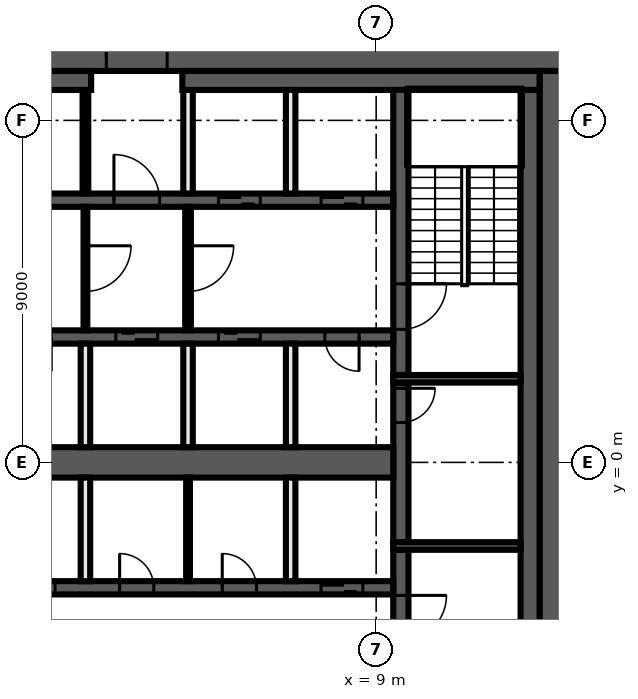
"""IFC4 building model, lengths in metres.
Left out: names, types, materials, properties, quantities, classifications, styles, units other than length and angle.
Written with IfcOpenShell. Run it as: python <this file> out.ifc"""

import sys

from ifc_helpers import new_model, si_unit, direction, frame, frame_2d, origin, place, context, subcontext, project, spatial, rectangle, extrude, element, fill, save


model = new_model("IFC4")
c1 = context("Model", 3, precision=1e-05, world=origin(), true_north=direction((0.0, 1.0)))
c2 = subcontext(c1, "Body", "Model", "MODEL_VIEW")
j1 = project(units=[si_unit("LENGTHUNIT", "METRE"), si_unit("PLANEANGLEUNIT", "RADIAN")], contexts=[c1])
p1 = place(None, origin())
s1 = spatial("IfcSite", under=j1, at=p1, CompositionType="ELEMENT")
p2 = place(p1, origin())
s2 = spatial("IfcBuilding", under=s1, at=p2, CompositionType="ELEMENT")
p3 = place(p2, frame((0.0, 0.0, 232.8)))
s3 = spatial("IfcBuildingStorey", under=s2, at=p3, CompositionType="ELEMENT", Elevation=232.8)
p4 = place(p3, frame((-14.0, 10.65, 0.0), z_axis=(0.0, 0.0, 1.0), x_axis=(1.0, 0.0, 0.0)))
e1 = element("IfcWall", 1, at=p4, inside=s3, PredefinedType="SHEAR", context=c2, shape_type="SweptSolid", body=[
    extrude(rectangle(XDim=28.0, YDim=0.7, at=frame_2d((14.0, 0.0))), origin(), (0.0, 0.0, 1.0), 3.75),
])
p5 = place(p4, frame((15.9, 0.0, 0.0)))
e2 = element("IfcOpeningElement", 2, at=p5, cuts=e1, PredefinedType="OPENING", context=c2, shape_type="SweptSolid", body=[
    extrude(rectangle(XDim=1.6, YDim=2.1, at=frame_2d((0.8, 1.05))), frame((0.0, 0.36, 0.0), z_axis=(0.0, -1.0, 0.0), x_axis=(1.0, 0.0, 0.0)), (0.0, 0.0, 1.0), 0.72),
])
p6 = place(p3, frame((13.65, 10.3, 0.0), z_axis=(0.0, 0.0, 1.0), x_axis=(0.0, -1.0, 0.0)))
e3 = element("IfcWall", 3, at=p6, inside=s3, PredefinedType="SHEAR", context=c2, shape_type="SweptSolid", body=[
    extrude(rectangle(XDim=20.6, YDim=0.7, at=frame_2d((10.3, 0.0))), origin(), (0.0, 0.0, 1.0), 3.75),
])
p7 = place(p3, frame((-13.3, 10.05, 0.0), z_axis=(0.0, 0.0, 1.0), x_axis=(1.0, 0.0, 0.0)))
e4 = element("IfcWall", 4, at=p7, inside=s3, PredefinedType="SHEAR", context=c2, shape_type="SweptSolid", body=[
    extrude(rectangle(XDim=14.8, YDim=0.5, at=frame_2d((7.4, 0.0))), origin(), (0.0, 0.0, 1.0), 3.75),
])
p8 = place(p3, frame((3.9, 10.05, 0.0), z_axis=(0.0, 0.0, 1.0), x_axis=(1.0, 0.0, 0.0)))
e5 = element("IfcWall", 5, at=p8, inside=s3, PredefinedType="SHEAR", context=c2, shape_type="SweptSolid", body=[
    extrude(rectangle(XDim=9.4, YDim=0.5, at=frame_2d((4.7, 0.0))), origin(), (0.0, 0.0, 1.0), 3.75),
])
p9 = place(p3, frame((13.05, 9.8, 0.0), z_axis=(0.0, 0.0, 1.0), x_axis=(0.0, -1.0, 0.0)))
e6 = element("IfcWall", 6, at=p9, inside=s3, PredefinedType="SHEAR", context=c2, shape_type="SweptSolid", body=[
    extrude(rectangle(XDim=19.6, YDim=0.5, at=frame_2d((9.8, 0.0))), origin(), (0.0, 0.0, 1.0), 3.75),
])
p10 = place(p3, frame((9.65, -2.3, 0.0), z_axis=(0.0, 0.0, 1.0), x_axis=(0.0, -1.0, 0.0)))
e7 = element("IfcWall", 7, at=p10, inside=s3, PredefinedType="SHEAR", context=c2, shape_type="SweptSolid", body=[
    extrude(rectangle(XDim=7.5, YDim=0.4, at=frame_2d((3.75, 0.0))), origin(), (0.0, 0.0, 1.0), 3.75),
])
p11 = place(p10, frame((1.2, 0.0, 0.0)))
e8 = element("IfcOpeningElement", 8, at=p11, cuts=e7, PredefinedType="OPENING", context=c2, shape_type="SweptSolid", body=[
    extrude(rectangle(XDim=1.2, YDim=2.1, at=frame_2d((0.6, 1.05))), frame((0.0, 0.21, 0.0), z_axis=(0.0, -1.0, 0.0), x_axis=(1.0, 0.0, 0.0)), (0.0, 0.0, 1.0), 0.42),
])
p12 = place(p3, frame((9.65, 2.1, 0.0), z_axis=(0.0, 0.0, 1.0), x_axis=(0.0, -1.0, 0.0)))
e9 = element("IfcWall", 9, at=p12, inside=s3, PredefinedType="SHEAR", context=c2, shape_type="SweptSolid", body=[
    extrude(rectangle(XDim=4.2, YDim=0.4, at=frame_2d((2.1, 0.0))), origin(), (0.0, 0.0, 1.0), 3.75),
])
p13 = place(p12, frame((0.15, 0.0, 0.0)))
e10 = element("IfcOpeningElement", 10, at=p13, cuts=e9, PredefinedType="OPENING", context=c2, shape_type="SweptSolid", body=[
    extrude(rectangle(XDim=0.9, YDim=2.1, at=frame_2d((0.45, 1.05))), frame((0.0, 0.21, 0.0), z_axis=(0.0, -1.0, 0.0), x_axis=(1.0, 0.0, 0.0)), (0.0, 0.0, 1.0), 0.42),
])
p14 = place(p3, frame((9.65, 9.8, 0.0), z_axis=(0.0, 0.0, 1.0), x_axis=(0.0, -1.0, 0.0)))
e11 = element("IfcWall", 11, at=p14, inside=s3, PredefinedType="SHEAR", context=c2, shape_type="SweptSolid", body=[
    extrude(rectangle(XDim=7.5, YDim=0.4, at=frame_2d((3.75, 0.0))), origin(), (0.0, 0.0, 1.0), 3.75),
])
p15 = place(p14, frame((5.1, 0.0, 0.0)))
e12 = element("IfcOpeningElement", 12, at=p15, cuts=e11, PredefinedType="OPENING", context=c2, shape_type="SweptSolid", body=[
    extrude(rectangle(XDim=1.2, YDim=2.1, at=frame_2d((0.6, 1.05))), frame((0.0, 0.21, 0.0), z_axis=(0.0, -1.0, 0.0), x_axis=(1.0, 0.0, 0.0)), (0.0, 0.0, 1.0), 0.42),
])
for number, where, z_axis, x_axis in (
    (13, (9.45, 2.2, 0.0), (0.0, 0.0, 1.0), (1.0, 0.0, 0.0)),
    (14, (9.45, -2.2, 0.0), (0.0, 0.0, 1.0), (1.0, 0.0, 0.0)),
):
    element("IfcWall", number, at=place(p3, frame(where, z_axis=z_axis, x_axis=x_axis)), inside=s3, PredefinedType="SHEAR", context=c2, shape_type="SweptSolid", body=[
        extrude(rectangle(XDim=3.35, YDim=0.2, at=frame_2d((1.675, 0.0))), origin(), (0.0, 0.0, 1.0), 3.75),
    ])
p16 = place(p3, frame((-9.45, 6.9, 0.0), z_axis=(0.0, 0.0, 1.0), x_axis=(1.0, 0.0, 0.0)))
e15 = element("IfcWall", 15, at=p16, inside=s3, PredefinedType="SHEAR", context=c2, shape_type="SweptSolid", body=[
    extrude(rectangle(XDim=18.9, YDim=0.35, at=frame_2d((9.45, 0.0))), origin(), (0.0, 0.0, 1.0), 3.75),
])
p17 = place(p16, frame((11.55, 0.0, 0.0)))
e16 = element("IfcOpeningElement", 16, at=p17, cuts=e15, PredefinedType="OPENING", context=c2, shape_type="SweptSolid", body=[
    extrude(rectangle(XDim=1.2, YDim=2.1, at=frame_2d((0.6, 1.05))), frame((0.0, 0.185, 0.0), z_axis=(0.0, -1.0, 0.0), x_axis=(1.0, 0.0, 0.0)), (0.0, 0.0, 1.0), 0.37),
])
p18 = place(p16, frame((14.3, 0.0, 0.0)))
e17 = element("IfcOpeningElement", 17, at=p18, cuts=e15, PredefinedType="OPENING", context=c2, shape_type="SweptSolid", body=[
    extrude(rectangle(XDim=1.1, YDim=2.1, at=frame_2d((0.55, 1.05))), frame((0.0, 0.185, 0.0), z_axis=(0.0, -1.0, 0.0), x_axis=(1.0, 0.0, 0.0)), (0.0, 0.0, 1.0), 0.37),
])
p19 = place(p16, frame((17.0, 0.0, 0.0)))
e18 = element("IfcOpeningElement", 18, at=p19, cuts=e15, PredefinedType="OPENING", context=c2, shape_type="SweptSolid", body=[
    extrude(rectangle(XDim=1.1, YDim=2.1, at=frame_2d((0.55, 1.05))), frame((0.0, 0.185, 0.0), z_axis=(0.0, -1.0, 0.0), x_axis=(1.0, 0.0, 0.0)), (0.0, 0.0, 1.0), 0.37),
])
p20 = place(p16, frame((2.25, 0.0, 0.0)))
e19 = element("IfcOpeningElement", 19, at=p20, cuts=e15, PredefinedType="OPENING", context=c2, shape_type="SweptSolid", body=[
    extrude(rectangle(XDim=0.9, YDim=2.1, at=frame_2d((0.45, 1.05))), frame((0.0, 0.185, 0.0), z_axis=(0.0, -1.0, 0.0), x_axis=(1.0, 0.0, 0.0)), (0.0, 0.0, 1.0), 0.37),
])
p21 = place(p16, frame((7.65, 0.0, 0.0)))
e20 = element("IfcOpeningElement", 20, at=p21, cuts=e15, PredefinedType="OPENING", context=c2, shape_type="SweptSolid", body=[
    extrude(rectangle(XDim=0.9, YDim=2.1, at=frame_2d((0.45, 1.05))), frame((0.0, 0.185, 0.0), z_axis=(0.0, -1.0, 0.0), x_axis=(1.0, 0.0, 0.0)), (0.0, 0.0, 1.0), 0.37),
])
p22 = place(p3, frame((9.45, 3.3, 0.0), z_axis=(0.0, 0.0, 1.0), x_axis=(-1.0, 0.0, 0.0)))
e21 = element("IfcWall", 21, at=p22, inside=s3, PredefinedType="SHEAR", context=c2, shape_type="SweptSolid", body=[
    extrude(rectangle(XDim=18.9, YDim=0.35, at=frame_2d((9.45, 0.0))), origin(), (0.0, 0.0, 1.0), 3.75),
])
p23 = place(p22, frame((6.2, 0.0, 0.0)))
e22 = element("IfcOpeningElement", 22, at=p23, cuts=e21, PredefinedType="OPENING", context=c2, shape_type="SweptSolid", body=[
    extrude(rectangle(XDim=1.1, YDim=2.1, at=frame_2d((0.55, 1.05))), frame((0.0, 0.185, 0.0), z_axis=(0.0, -1.0, 0.0), x_axis=(1.0, 0.0, 0.0)), (0.0, 0.0, 1.0), 0.37),
])
p24 = place(p22, frame((3.5, 0.0, 0.0)))
e23 = element("IfcOpeningElement", 23, at=p24, cuts=e21, PredefinedType="OPENING", context=c2, shape_type="SweptSolid", body=[
    extrude(rectangle(XDim=1.1, YDim=2.1, at=frame_2d((0.55, 1.05))), frame((0.0, 0.185, 0.0), z_axis=(0.0, -1.0, 0.0), x_axis=(1.0, 0.0, 0.0)), (0.0, 0.0, 1.0), 0.37),
])
p25 = place(p22, frame((0.9, 0.0, 0.0)))
e24 = element("IfcOpeningElement", 24, at=p25, cuts=e21, PredefinedType="OPENING", context=c2, shape_type="SweptSolid", body=[
    extrude(rectangle(XDim=0.9, YDim=2.1, at=frame_2d((0.45, 1.05))), frame((0.0, 0.185, 0.0), z_axis=(0.0, -1.0, 0.0), x_axis=(1.0, 0.0, 0.0)), (0.0, 0.0, 1.0), 0.37),
])
p26 = place(p22, frame((17.1, 0.0, 0.0)))
e25 = element("IfcOpeningElement", 25, at=p26, cuts=e21, PredefinedType="OPENING", context=c2, shape_type="SweptSolid", body=[
    extrude(rectangle(XDim=0.9, YDim=2.1, at=frame_2d((0.45, 1.05))), frame((0.0, 0.185, 0.0), z_axis=(0.0, -1.0, 0.0), x_axis=(1.0, 0.0, 0.0)), (0.0, 0.0, 1.0), 0.37),
])
p27 = place(p22, frame((14.4, 0.0, 0.0)))
e26 = element("IfcOpeningElement", 26, at=p27, cuts=e21, PredefinedType="OPENING", context=c2, shape_type="SweptSolid", body=[
    extrude(rectangle(XDim=0.9, YDim=2.1, at=frame_2d((0.45, 1.05))), frame((0.0, 0.185, 0.0), z_axis=(0.0, -1.0, 0.0), x_axis=(1.0, 0.0, 0.0)), (0.0, 0.0, 1.0), 0.37),
])
p28 = place(p22, frame((11.7, 0.0, 0.0)))
e27 = element("IfcOpeningElement", 27, at=p28, cuts=e21, PredefinedType="OPENING", context=c2, shape_type="SweptSolid", body=[
    extrude(rectangle(XDim=0.9, YDim=2.1, at=frame_2d((0.45, 1.05))), frame((0.0, 0.185, 0.0), z_axis=(0.0, -1.0, 0.0), x_axis=(1.0, 0.0, 0.0)), (0.0, 0.0, 1.0), 0.37),
])
p29 = place(p22, frame((9.0, 0.0, 0.0)))
e28 = element("IfcOpeningElement", 28, at=p29, cuts=e21, PredefinedType="OPENING", context=c2, shape_type="SweptSolid", body=[
    extrude(rectangle(XDim=0.9, YDim=2.1, at=frame_2d((0.45, 1.05))), frame((0.0, 0.185, 0.0), z_axis=(0.0, -1.0, 0.0), x_axis=(1.0, 0.0, 0.0)), (0.0, 0.0, 1.0), 0.37),
])
p30 = place(p3, frame((-9.45, -3.3, 0.0), z_axis=(0.0, 0.0, 1.0), x_axis=(1.0, 0.0, 0.0)))
e29 = element("IfcWall", 29, at=p30, inside=s3, PredefinedType="SHEAR", context=c2, shape_type="SweptSolid", body=[
    extrude(rectangle(XDim=18.9, YDim=0.35, at=frame_2d((9.45, 0.0))), origin(), (0.0, 0.0, 1.0), 3.75),
])
p31 = place(p30, frame((0.8, 0.0, 0.0)))
e30 = element("IfcOpeningElement", 30, at=p31, cuts=e29, PredefinedType="OPENING", context=c2, shape_type="SweptSolid", body=[
    extrude(rectangle(XDim=1.1, YDim=2.1, at=frame_2d((0.55, 1.05))), frame((0.0, 0.185, 0.0), z_axis=(0.0, -1.0, 0.0), x_axis=(1.0, 0.0, 0.0)), (0.0, 0.0, 1.0), 0.37),
])
p32 = place(p30, frame((3.5, 0.0, 0.0)))
e31 = element("IfcOpeningElement", 31, at=p32, cuts=e29, PredefinedType="OPENING", context=c2, shape_type="SweptSolid", body=[
    extrude(rectangle(XDim=1.1, YDim=2.1, at=frame_2d((0.55, 1.05))), frame((0.0, 0.185, 0.0), z_axis=(0.0, -1.0, 0.0), x_axis=(1.0, 0.0, 0.0)), (0.0, 0.0, 1.0), 0.37),
])
p33 = place(p30, frame((6.2, 0.0, 0.0)))
e32 = element("IfcOpeningElement", 32, at=p33, cuts=e29, PredefinedType="OPENING", context=c2, shape_type="SweptSolid", body=[
    extrude(rectangle(XDim=1.1, YDim=2.1, at=frame_2d((0.55, 1.05))), frame((0.0, 0.185, 0.0), z_axis=(0.0, -1.0, 0.0), x_axis=(1.0, 0.0, 0.0)), (0.0, 0.0, 1.0), 0.37),
])
p34 = place(p30, frame((8.9, 0.0, 0.0)))
e33 = element("IfcOpeningElement", 33, at=p34, cuts=e29, PredefinedType="OPENING", context=c2, shape_type="SweptSolid", body=[
    extrude(rectangle(XDim=1.1, YDim=2.1, at=frame_2d((0.55, 1.05))), frame((0.0, 0.185, 0.0), z_axis=(0.0, -1.0, 0.0), x_axis=(1.0, 0.0, 0.0)), (0.0, 0.0, 1.0), 0.37),
])
p35 = place(p30, frame((17.0, 0.0, 0.0)))
e34 = element("IfcOpeningElement", 34, at=p35, cuts=e29, PredefinedType="OPENING", context=c2, shape_type="SweptSolid", body=[
    extrude(rectangle(XDim=1.1, YDim=2.1, at=frame_2d((0.55, 1.05))), frame((0.0, 0.185, 0.0), z_axis=(0.0, -1.0, 0.0), x_axis=(1.0, 0.0, 0.0)), (0.0, 0.0, 1.0), 0.37),
])
p36 = place(p30, frame((11.7, 0.0, 0.0)))
e35 = element("IfcOpeningElement", 35, at=p36, cuts=e29, PredefinedType="OPENING", context=c2, shape_type="SweptSolid", body=[
    extrude(rectangle(XDim=0.9, YDim=2.1, at=frame_2d((0.45, 1.05))), frame((0.0, 0.185, 0.0), z_axis=(0.0, -1.0, 0.0), x_axis=(1.0, 0.0, 0.0)), (0.0, 0.0, 1.0), 0.37),
])
p37 = place(p30, frame((14.4, 0.0, 0.0)))
e36 = element("IfcOpeningElement", 36, at=p37, cuts=e29, PredefinedType="OPENING", context=c2, shape_type="SweptSolid", body=[
    extrude(rectangle(XDim=0.9, YDim=2.1, at=frame_2d((0.45, 1.05))), frame((0.0, 0.185, 0.0), z_axis=(0.0, -1.0, 0.0), x_axis=(1.0, 0.0, 0.0)), (0.0, 0.0, 1.0), 0.37),
])
p38 = place(p3, frame((-9.45, 0.0, 0.0), z_axis=(0.0, 0.0, 1.0), x_axis=(1.0, 0.0, 0.0)))
e37 = element("IfcWall", 37, at=p38, inside=s3, PredefinedType="SHEAR", context=c2, shape_type="SweptSolid", body=[
    extrude(rectangle(XDim=18.9, YDim=0.8, at=frame_2d((9.45, 0.0))), origin(), (0.0, 0.0, 1.0), 3.75),
])
for number, where, z_axis, x_axis in (
    (38, (6.75, -3.125, 0.0), (0.0, 0.0, 1.0), (0.0, 1.0, 0.0)),
    (39, (6.75, 0.4, 0.0), (0.0, 0.0, 1.0), (0.0, 1.0, 0.0)),
    (40, (6.75, 7.075, 0.0), (0.0, 0.0, 1.0), (0.0, 1.0, 0.0)),
):
    element("IfcWall", number, at=place(p3, frame(where, z_axis=z_axis, x_axis=x_axis)), inside=s3, PredefinedType="SOLIDWALL", context=c2, shape_type="SweptSolid", body=[
        extrude(rectangle(XDim=2.725, YDim=0.25, at=frame_2d((1.363, 0.0))), origin(), (0.0, 0.0, 1.0), 3.75),
    ])
p39 = place(p3, frame((4.05, 6.725, 0.0), z_axis=(0.0, 0.0, 1.0), x_axis=(0.0, -1.0, 0.0)))
e41 = element("IfcWall", 41, at=p39, inside=s3, PredefinedType="PARTITIONING", context=c2, shape_type="SweptSolid", body=[
    extrude(rectangle(XDim=3.25, YDim=0.15, at=frame_2d((1.625, 0.0))), origin(), (0.0, 0.0, 1.0), 3.75),
])
p40 = place(p39, frame((1.025, 0.0, 0.0)))
e42 = element("IfcOpeningElement", 42, at=p40, cuts=e41, PredefinedType="OPENING", context=c2, shape_type="SweptSolid", body=[
    extrude(rectangle(XDim=1.2, YDim=2.1, at=frame_2d((0.6, 1.05))), frame((0.0, 0.085, 0.0), z_axis=(0.0, -1.0, 0.0), x_axis=(1.0, 0.0, 0.0)), (0.0, 0.0, 1.0), 0.17),
])
p41 = place(p3, frame((4.05, -3.125, 0.0), z_axis=(0.0, 0.0, 1.0), x_axis=(0.0, 1.0, 0.0)))
e43 = element("IfcWall", 43, at=p41, inside=s3, PredefinedType="PARTITIONING", context=c2, shape_type="SweptSolid", body=[
    extrude(rectangle(XDim=2.725, YDim=0.1, at=frame_2d((1.363, 0.0))), origin(), (0.0, 0.0, 1.0), 3.75),
])
for number, where, z_axis, x_axis in (
    (44, (4.05, 0.4, 0.0), (0.0, 0.0, 1.0), (0.0, 1.0, 0.0)),
    (45, (4.05, 7.075, 0.0), (0.0, 0.0, 1.0), (0.0, 1.0, 0.0)),
):
    element("IfcWall", number, at=place(p3, frame(where, z_axis=z_axis, x_axis=x_axis)), inside=s3, PredefinedType="SOLIDWALL", context=c2, shape_type="SweptSolid", body=[
        extrude(rectangle(XDim=2.725, YDim=0.25, at=frame_2d((1.363, 0.0))), origin(), (0.0, 0.0, 1.0), 3.75),
    ])
p42 = place(p3, frame((1.35, 7.075, 0.0), z_axis=(0.0, 0.0, 1.0), x_axis=(0.0, 1.0, 0.0)))
e46 = element("IfcWall", 46, at=p42, inside=s3, PredefinedType="PARTITIONING", context=c2, shape_type="SweptSolid", body=[
    extrude(rectangle(XDim=2.725, YDim=0.15, at=frame_2d((1.363, 0.0))), origin(), (0.0, 0.0, 1.0), 3.75),
])
p43 = place(p3, frame((1.35, 6.725, 0.0), z_axis=(0.0, 0.0, 1.0), x_axis=(0.0, -1.0, 0.0)))
e47 = element("IfcWall", 47, at=p43, inside=s3, PredefinedType="PARTITIONING", context=c2, shape_type="SweptSolid", body=[
    extrude(rectangle(XDim=3.25, YDim=0.1, at=frame_2d((1.625, 0.0))), origin(), (0.0, 0.0, 1.0), 3.75),
])
p44 = place(p43, frame((1.025, 0.0, 0.0)))
e48 = element("IfcOpeningElement", 48, at=p44, cuts=e47, PredefinedType="OPENING", context=c2, shape_type="SweptSolid", body=[
    extrude(rectangle(XDim=1.2, YDim=2.1, at=frame_2d((0.6, 1.05))), frame((0.0, 0.06, 0.0), z_axis=(0.0, -1.0, 0.0), x_axis=(1.0, 0.0, 0.0)), (0.0, 0.0, 1.0), 0.12),
])
for number, where, z_axis, x_axis in (
    (49, (1.35, -3.125, 0.0), (0.0, 0.0, 1.0), (0.0, 1.0, 0.0)),
    (50, (1.35, 0.4, 0.0), (0.0, 0.0, 1.0), (0.0, 1.0, 0.0)),
):
    element("IfcWall", number, at=place(p3, frame(where, z_axis=z_axis, x_axis=x_axis)), inside=s3, PredefinedType="SOLIDWALL", context=c2, shape_type="SweptSolid", body=[
        extrude(rectangle(XDim=2.725, YDim=0.25, at=frame_2d((1.363, 0.0))), origin(), (0.0, 0.0, 1.0), 3.75),
    ])
p45 = place(p13, origin())
e51 = element("IfcDoor", 51, at=p45, inside=s3, OperationType="SINGLE_SWING_RIGHT", PredefinedType="DOOR", context=c2, shape_type="SweptSolid", body=[
    extrude(rectangle(XDim=0.9, YDim=2.1, at=frame_2d((0.45, 1.05))), frame((0.0, 0.025, 0.0), z_axis=(0.0, -1.0, 0.0), x_axis=(1.0, 0.0, 0.0)), (0.0, 0.0, 1.0), 0.05),
])
fill(e10, e51)
p46 = place(p5, origin())
e52 = element("IfcDoor", 52, at=p46, inside=s3, OperationType="DOUBLE_DOOR_SINGLE_SWING", PredefinedType="DOOR", context=c2, shape_type="SweptSolid", body=[
    extrude(rectangle(XDim=1.6, YDim=2.1, at=frame_2d((0.8, 1.05))), frame((0.0, 0.025, 0.0), z_axis=(0.0, -1.0, 0.0), x_axis=(1.0, 0.0, 0.0)), (0.0, 0.0, 1.0), 0.05),
])
fill(e2, e52)
p47 = place(p17, origin())
e53 = element("IfcDoor", 53, at=p47, inside=s3, OperationType="SINGLE_SWING_LEFT", PredefinedType="DOOR", context=c2, shape_type="SweptSolid", body=[
    extrude(rectangle(XDim=1.2, YDim=2.1, at=frame_2d((0.6, 1.05))), frame((0.0, 0.025, 0.0), z_axis=(0.0, -1.0, 0.0), x_axis=(1.0, 0.0, 0.0)), (0.0, 0.0, 1.0), 0.05),
])
fill(e16, e53)
p48 = place(p18, origin())
e54 = element("IfcDoor", 54, at=p48, inside=s3, OperationType="DOUBLE_DOOR_SLIDING", PredefinedType="DOOR", context=c2, shape_type="SweptSolid", body=[
    extrude(rectangle(XDim=1.1, YDim=2.1, at=frame_2d((0.55, 1.05))), frame((0.0, 0.025, 0.0), z_axis=(0.0, -1.0, 0.0), x_axis=(1.0, 0.0, 0.0)), (0.0, 0.0, 1.0), 0.05),
])
fill(e17, e54)
p49 = place(p19, origin())
e55 = element("IfcDoor", 55, at=p49, inside=s3, OperationType="DOUBLE_DOOR_SLIDING", PredefinedType="DOOR", context=c2, shape_type="SweptSolid", body=[
    extrude(rectangle(XDim=1.1, YDim=2.1, at=frame_2d((0.55, 1.05))), frame((0.0, 0.025, 0.0), z_axis=(0.0, -1.0, 0.0), x_axis=(1.0, 0.0, 0.0)), (0.0, 0.0, 1.0), 0.05),
])
fill(e18, e55)
p50 = place(p23, origin())
e56 = element("IfcDoor", 56, at=p50, inside=s3, OperationType="DOUBLE_DOOR_SLIDING", PredefinedType="DOOR", context=c2, shape_type="SweptSolid", body=[
    extrude(rectangle(XDim=1.1, YDim=2.1, at=frame_2d((0.55, 1.05))), frame((0.0, 0.025, 0.0), z_axis=(0.0, -1.0, 0.0), x_axis=(1.0, 0.0, 0.0)), (0.0, 0.0, 1.0), 0.05),
])
fill(e22, e56)
p51 = place(p24, origin())
e57 = element("IfcDoor", 57, at=p51, inside=s3, OperationType="DOUBLE_DOOR_SLIDING", PredefinedType="DOOR", context=c2, shape_type="SweptSolid", body=[
    extrude(rectangle(XDim=1.1, YDim=2.1, at=frame_2d((0.55, 1.05))), frame((0.0, 0.025, 0.0), z_axis=(0.0, -1.0, 0.0), x_axis=(1.0, 0.0, 0.0)), (0.0, 0.0, 1.0), 0.05),
])
fill(e23, e57)
p52 = place(p25, origin())
e58 = element("IfcDoor", 58, at=p52, inside=s3, OperationType="SINGLE_SWING_LEFT", PredefinedType="DOOR", context=c2, shape_type="SweptSolid", body=[
    extrude(rectangle(XDim=0.9, YDim=2.1, at=frame_2d((0.45, 1.05))), frame((0.0, 0.025, 0.0), z_axis=(0.0, -1.0, 0.0), x_axis=(1.0, 0.0, 0.0)), (0.0, 0.0, 1.0), 0.05),
])
fill(e24, e58)
p53 = place(p34, origin())
e59 = element("IfcDoor", 59, at=p53, inside=s3, OperationType="DOUBLE_DOOR_SLIDING", PredefinedType="DOOR", context=c2, shape_type="SweptSolid", body=[
    extrude(rectangle(XDim=1.1, YDim=2.1, at=frame_2d((0.55, 1.05))), frame((0.0, 0.025, 0.0), z_axis=(0.0, -1.0, 0.0), x_axis=(1.0, 0.0, 0.0)), (0.0, 0.0, 1.0), 0.05),
])
fill(e33, e59)
p54 = place(p35, origin())
e60 = element("IfcDoor", 60, at=p54, inside=s3, OperationType="DOUBLE_DOOR_SLIDING", PredefinedType="DOOR", context=c2, shape_type="SweptSolid", body=[
    extrude(rectangle(XDim=1.1, YDim=2.1, at=frame_2d((0.55, 1.05))), frame((0.0, 0.025, 0.0), z_axis=(0.0, -1.0, 0.0), x_axis=(1.0, 0.0, 0.0)), (0.0, 0.0, 1.0), 0.05),
])
fill(e34, e60)
p55 = place(p36, origin())
e61 = element("IfcDoor", 61, at=p55, inside=s3, OperationType="SINGLE_SWING_RIGHT", PredefinedType="DOOR", context=c2, shape_type="SweptSolid", body=[
    extrude(rectangle(XDim=0.9, YDim=2.1, at=frame_2d((0.45, 1.05))), frame((0.0, 0.025, 0.0), z_axis=(0.0, -1.0, 0.0), x_axis=(1.0, 0.0, 0.0)), (0.0, 0.0, 1.0), 0.05),
])
fill(e35, e61)
p56 = place(p37, origin())
e62 = element("IfcDoor", 62, at=p56, inside=s3, OperationType="SINGLE_SWING_LEFT", PredefinedType="DOOR", context=c2, shape_type="SweptSolid", body=[
    extrude(rectangle(XDim=0.9, YDim=2.1, at=frame_2d((0.45, 1.05))), frame((0.0, 0.025, 0.0), z_axis=(0.0, -1.0, 0.0), x_axis=(1.0, 0.0, 0.0)), (0.0, 0.0, 1.0), 0.05),
])
fill(e36, e62)
p57 = place(p15, origin())
e63 = element("IfcDoor", 63, at=p57, inside=s3, OperationType="SINGLE_SWING_LEFT", PredefinedType="DOOR", context=c2, shape_type="SweptSolid", body=[
    extrude(rectangle(XDim=1.2, YDim=2.1, at=frame_2d((0.6, 1.05))), frame((0.0, 0.025, 0.0), z_axis=(0.0, -1.0, 0.0), x_axis=(1.0, 0.0, 0.0)), (0.0, 0.0, 1.0), 0.05),
])
fill(e12, e63)
p58 = place(p11, origin())
e64 = element("IfcDoor", 64, at=p58, inside=s3, OperationType="SINGLE_SWING_RIGHT", PredefinedType="DOOR", context=c2, shape_type="SweptSolid", body=[
    extrude(rectangle(XDim=1.2, YDim=2.1, at=frame_2d((0.6, 1.05))), frame((0.0, 0.025, 0.0), z_axis=(0.0, -1.0, 0.0), x_axis=(1.0, 0.0, 0.0)), (0.0, 0.0, 1.0), 0.05),
])
fill(e8, e64)
p59 = place(p44, origin())
e65 = element("IfcDoor", 65, at=p59, inside=s3, OperationType="SINGLE_SWING_LEFT", PredefinedType="DOOR", context=c2, shape_type="SweptSolid", body=[
    extrude(rectangle(XDim=1.2, YDim=2.1, at=frame_2d((0.6, 1.05))), frame((0.0, 0.025, 0.0), z_axis=(0.0, -1.0, 0.0), x_axis=(1.0, 0.0, 0.0)), (0.0, 0.0, 1.0), 0.05),
])
fill(e48, e65)
p60 = place(p40, origin())
e66 = element("IfcDoor", 66, at=p60, inside=s3, OperationType="SINGLE_SWING_RIGHT", PredefinedType="DOOR", context=c2, shape_type="SweptSolid", body=[
    extrude(rectangle(XDim=1.2, YDim=2.1, at=frame_2d((0.6, 1.05))), frame((0.0, 0.025, 0.0), z_axis=(0.0, -1.0, 0.0), x_axis=(1.0, 0.0, 0.0)), (0.0, 0.0, 1.0), 0.05),
])
fill(e42, e66)
save(model, sys.argv[1])
